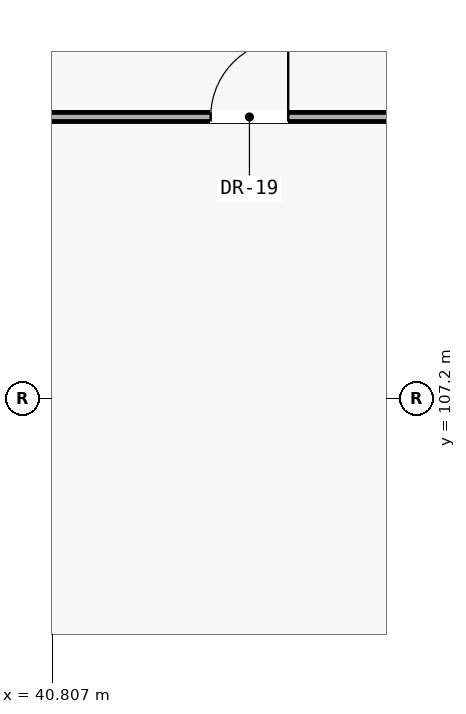
"""IFC4 building model, lengths in metres.
Left out: names, types, materials, properties, quantities, classifications, styles, units other than length and angle.
Written with IfcOpenShell. Run it as: python <this file> out.ifc"""

import sys

from ifc_helpers import new_model, si_unit, direction, frame, frame_2d, origin, place, context, subcontext, project, spatial, rectangle, extrude, element, fill, save


model = new_model("IFC4")
c1 = context("Model", 3, precision=1e-05, world=origin(), true_north=direction((0.0, 1.0)))
c2 = subcontext(c1, "Body", "Model", "MODEL_VIEW")
j1 = project(units=[si_unit("LENGTHUNIT", "METRE"), si_unit("PLANEANGLEUNIT", "RADIAN")], contexts=[c1])
p1 = place(None, origin())
s1 = spatial("IfcSite", under=j1, at=p1, CompositionType="ELEMENT")
p2 = place(p1, origin())
s2 = spatial("IfcBuilding", under=s1, at=p2, CompositionType="ELEMENT")
p3 = place(p2, frame((0.0, 0.0, 13.65)))
s3 = spatial("IfcBuildingStorey", under=s2, at=p3, CompositionType="ELEMENT", Elevation=13.65)
p4 = place(p3, frame((29.2, 110.9, 0.0), z_axis=(0.0, 0.0, 1.0), x_axis=(1.0, 0.0, 0.0)))
e1 = element("IfcWall", 1, at=p4, inside=s3, PredefinedType="PARTITIONING", context=c2, shape_type="SweptSolid", body=[
    extrude(rectangle(XDim=28.4, YDim=0.12, at=frame_2d((14.2, 0.0))), origin(), (0.0, 0.0, 1.0), 3.98),
])
p5 = place(p4, frame((13.69, 0.0, 0.0)))
e2 = element("IfcOpeningElement", 2, at=p5, cuts=e1, PredefinedType="OPENING", context=c2, shape_type="SweptSolid", body=[
    extrude(rectangle(XDim=1.02, YDim=2.1, at=frame_2d((0.51, 1.05))), frame((0.0, 0.07, 0.0), z_axis=(0.0, -1.0, 0.0), x_axis=(1.0, 0.0, 0.0)), (0.0, 0.0, 1.0), 0.14),
])
p6 = place(p5, origin())
e3 = element("IfcDoor", 3, at=p6, inside=s3, OperationType="SINGLE_SWING_RIGHT", PredefinedType="DOOR", context=c2, shape_type="SweptSolid", body=[
    extrude(rectangle(XDim=1.02, YDim=2.1, at=frame_2d((0.51, 1.05))), frame((0.0, 0.025, 0.0), z_axis=(0.0, -1.0, 0.0), x_axis=(1.0, 0.0, 0.0)), (0.0, 0.0, 1.0), 0.05),
])
fill(e2, e3)
save(model, sys.argv[1])
